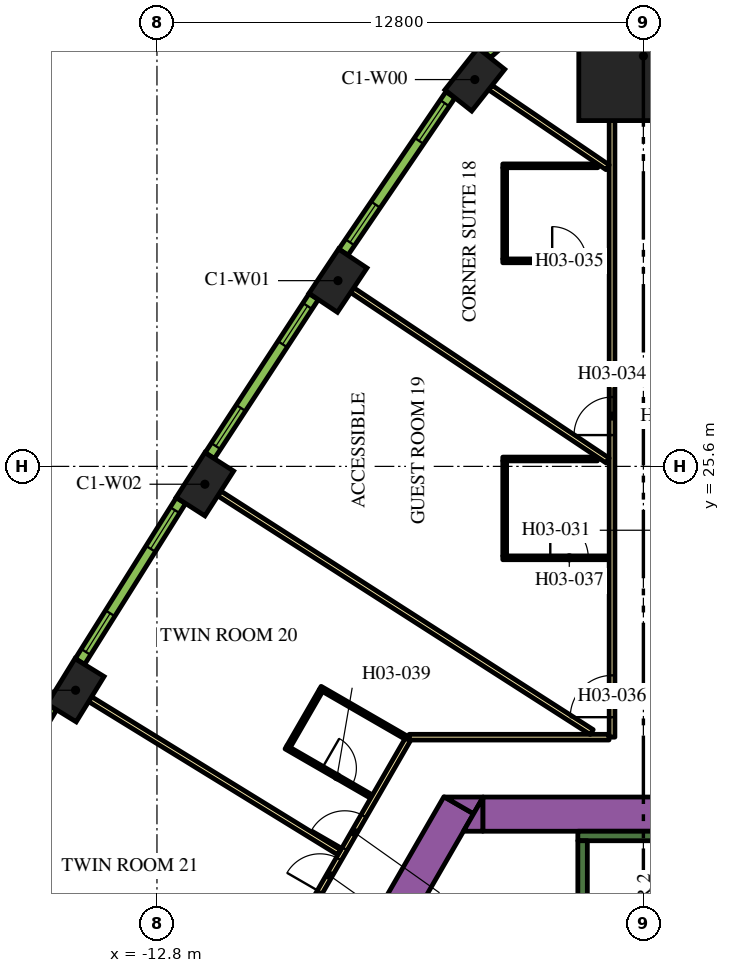
"""IFC4 building model, lengths in metres.
Left out: names, types, materials, properties, quantities, classifications, styles, units other than length and angle.
Written with IfcOpenShell. Run it as: python <this file> out.ifc"""

import sys

from ifc_helpers import new_model, si_unit, direction, frame, frame_2d, origin, origin_2d, place, context, subcontext, project, spatial, polyline, rectangle, outline, extrude, element, fill, save


model = new_model("IFC4")
c1 = context("Model", 3, precision=1e-05, world=origin(), true_north=direction((0.0, 1.0)))
c2 = subcontext(c1, "Body", "Model", "MODEL_VIEW")
j1 = project(units=[si_unit("LENGTHUNIT", "METRE"), si_unit("PLANEANGLEUNIT", "RADIAN")], contexts=[c1])
p1 = place(None, origin())
s1 = spatial("IfcSite", under=j1, at=p1, CompositionType="ELEMENT")
p2 = place(p1, origin())
s2 = spatial("IfcBuilding", under=s1, at=p2, CompositionType="ELEMENT")
p3 = place(p2, frame((0.0, 0.0, 51.0)))
s3 = spatial("IfcBuildingStorey", under=s2, at=p3, CompositionType="ELEMENT", Elevation=51.0)
p4 = place(p3, frame((0.0, 36.399, 0.0), z_axis=(0.0, 0.0, 1.0), x_axis=(0.0, 1.0, 0.0)))
e1 = element("IfcColumn", 1, at=p4, inside=s3, PredefinedType="COLUMN", context=c2, shape_type="SweptSolid", body=[
    extrude(rectangle(XDim=3.4, YDim=3.4, at=origin_2d()), origin(), (0.0, 0.0, 1.0), 3.9),
])
for number, where, z_axis, x_axis in (
    (2, (-4.436, 35.778, 0.0), (0.0, 0.0, 1.0), (-0.62, -0.784, 0.0)),
    (3, (-8.037, 30.487, 0.0), (0.0, 0.0, 1.0), (-0.555, -0.832, 0.0)),
    (4, (-11.539, 25.131, 0.0), (0.0, 0.0, 1.0), (-0.539, -0.842, 0.0)),
    (5, (-14.942, 19.71, 0.0), (0.0, 0.0, 1.0), (-0.524, -0.852, 0.0)),
):
    element("IfcColumn", number, at=place(p3, frame(where, z_axis=z_axis, x_axis=x_axis)), inside=s3, PredefinedType="COLUMN", context=c2, shape_type="SweptSolid", body=[
        extrude(rectangle(XDim=1.4, YDim=0.9, at=origin_2d()), origin(), (0.0, 0.0, 1.0), 3.9),
    ])
p5 = place(p3, frame((-15.36, -1.503, 0.0), z_axis=(0.0, 0.0, 1.0), x_axis=(0.50000389221, 0.866023156604, 0.0)))
e6 = element("IfcWall", 6, at=p5, inside=s3, PredefinedType="SOLIDWALL", context=c2, shape_type="SweptSolid", body=[
    extrude(rectangle(XDim=21.0, YDim=0.9, at=frame_2d((10.5, 0.0))), origin(), (0.0, 0.0, 1.0), 3.9),
])
p6 = place(p3, origin())
e7 = element("IfcWall", 7, at=p6, inside=s3, PredefinedType="SOLIDWALL", context=c2, shape_type="SweptSolid", body=[
    extrude(outline(polyline([(-4.215, 16.9), (-4.469, 16.46), (-5.231, 16.9), (-4.215, 16.9)])), origin(), (0.0, 0.0, 1.0), 3.9),
])
p7 = place(p3, frame((-4.224, 16.45, 0.0), z_axis=(0.0, 0.0, 1.0), x_axis=(1.0, 0.0, 0.0)))
e8 = element("IfcWall", 8, at=p7, inside=s3, PredefinedType="SOLIDWALL", context=c2, shape_type="SweptSolid", body=[
    extrude(rectangle(XDim=9.488, YDim=0.9, at=frame_2d((4.744, 0.0))), origin(), (0.0, 0.0, 1.0), 3.9),
])
e9 = element("IfcWall", 9, at=p6, inside=s3, PredefinedType="SOLIDWALL", context=c2, shape_type="SweptSolid", body=[
    extrude(outline(polyline([(-4.734, 16.0), (-4.226, 16.88), (-4.226, 16.0), (-4.734, 16.0)])), origin(), (0.0, 0.0, 1.0), 3.9),
])
p8 = place(p3, frame((-1.725, 15.875, 0.0), z_axis=(0.0, 0.0, 1.0), x_axis=(1.0, 0.0, 0.0)))
e10 = element("IfcWall", 10, at=p8, inside=s3, PredefinedType="SOLIDWALL", context=c2, shape_type="SweptSolid", body=[
    extrude(rectangle(XDim=3.45, YDim=0.25, at=frame_2d((1.725, 0.0))), origin(), (0.0, 0.0, 1.0), 3.9),
])
p9 = place(p3, frame((-1.6, 8.7, 0.0), z_axis=(0.0, 0.0, 1.0), x_axis=(0.0, 1.0, 0.0)))
e11 = element("IfcWall", 11, at=p9, inside=s3, PredefinedType="SOLIDWALL", context=c2, shape_type="SweptSolid", body=[
    extrude(rectangle(XDim=7.05, YDim=0.25, at=frame_2d((3.525, 0.0))), origin(), (0.0, 0.0, 1.0), 3.9),
])
p10 = place(p3, frame((-0.825, 18.475, 0.0), z_axis=(0.0, 0.0, 1.0), x_axis=(0.0, 1.0, 0.0)))
e12 = element("IfcWall", 12, at=p10, inside=s3, PredefinedType="PARTITIONING", context=c2, shape_type="SweptSolid", body=[
    extrude(rectangle(XDim=16.224, YDim=0.15, at=frame_2d((8.112, 0.0))), origin(), (0.0, 0.0, 1.0), 2.75),
])
p11 = place(p10, frame((7.949, 0.0, 0.0)))
e13 = element("IfcOpeningElement", 13, at=p11, cuts=e12, PredefinedType="OPENING", context=c2, shape_type="SweptSolid", body=[
    extrude(rectangle(XDim=1.0, YDim=2.1, at=frame_2d((0.5, 1.05))), frame((0.0, 0.085, 0.0), z_axis=(0.0, -1.0, 0.0), x_axis=(1.0, 0.0, 0.0)), (0.0, 0.0, 1.0), 0.17),
])
p12 = place(p10, frame((0.526, 0.0, 0.0)))
e14 = element("IfcOpeningElement", 14, at=p12, cuts=e12, PredefinedType="OPENING", context=c2, shape_type="SweptSolid", body=[
    extrude(rectangle(XDim=1.1, YDim=2.1, at=frame_2d((0.55, 1.05))), frame((0.0, 0.085, 0.0), z_axis=(0.0, -1.0, 0.0), x_axis=(1.0, 0.0, 0.0)), (0.0, 0.0, 1.0), 0.17),
])
p13 = place(p3, frame((-6.163, 18.475, 0.0), z_axis=(0.0, 0.0, 1.0), x_axis=(1.0, 0.0, 0.0)))
e15 = element("IfcWall", 15, at=p13, inside=s3, PredefinedType="PARTITIONING", context=c2, shape_type="SweptSolid", body=[
    extrude(rectangle(XDim=5.258, YDim=0.15, at=frame_2d((2.629, 0.0))), origin(), (0.0, 0.0, 1.0), 2.75),
])
p14 = place(p3, frame((-19.081, -3.9, 0.0), z_axis=(0.0, 0.0, 1.0), x_axis=(0.499998313975, 0.866026377209, 0.0)))
e16 = element("IfcWall", 16, at=p14, inside=s3, PredefinedType="PARTITIONING", context=c2, shape_type="SweptSolid", body=[
    extrude(rectangle(XDim=25.766, YDim=0.15, at=frame_2d((12.883, 0.0))), origin(), (0.0, 0.0, 1.0), 2.75),
])
p15 = place(p14, frame((22.445, 0.0, 0.0)))
e17 = element("IfcOpeningElement", 17, at=p15, cuts=e16, PredefinedType="OPENING", context=c2, shape_type="SweptSolid", body=[
    extrude(rectangle(XDim=1.0, YDim=2.1, at=frame_2d((0.5, 1.05))), frame((0.0, 0.085, 0.0), z_axis=(0.0, -1.0, 0.0), x_axis=(1.0, 0.0, 0.0)), (0.0, 0.0, 1.0), 0.17),
])
p16 = place(p14, frame((21.138, 0.0, 0.0)))
e18 = element("IfcOpeningElement", 18, at=p16, cuts=e16, PredefinedType="OPENING", context=c2, shape_type="SweptSolid", body=[
    extrude(rectangle(XDim=1.0, YDim=2.1, at=frame_2d((0.5, 1.05))), frame((0.0, 0.085, 0.0), z_axis=(0.0, -1.0, 0.0), x_axis=(1.0, 0.0, 0.0)), (0.0, 0.0, 1.0), 0.17),
])
p17 = place(p14, frame((14.066, 0.0, 0.0)))
e19 = element("IfcOpeningElement", 19, at=p17, cuts=e16, PredefinedType="OPENING", context=c2, shape_type="SweptSolid", body=[
    extrude(rectangle(XDim=0.9, YDim=2.1, at=frame_2d((0.45, 1.05))), frame((0.0, 0.085, 0.0), z_axis=(0.0, -1.0, 0.0), x_axis=(1.0, 0.0, 0.0)), (0.0, 0.0, 1.0), 0.17),
])
p18 = place(p14, frame((11.693, 0.0, 0.0)))
e20 = element("IfcOpeningElement", 20, at=p18, cuts=e16, PredefinedType="OPENING", context=c2, shape_type="SweptSolid", body=[
    extrude(rectangle(XDim=1.0, YDim=2.1, at=frame_2d((0.5, 1.05))), frame((0.0, 0.085, 0.0), z_axis=(0.0, -1.0, 0.0), x_axis=(1.0, 0.0, 0.0)), (0.0, 0.0, 1.0), 0.17),
])
p19 = place(p3, frame((-14.558, 19.475, 0.0), z_axis=(0.0, 0.0, 1.0), x_axis=(0.851829455142, -0.523819223925, 0.0)))
e21 = element("IfcWall", 21, at=p19, inside=s3, PredefinedType="PARTITIONING", context=c2, shape_type="SweptSolid", body=[
    extrude(rectangle(XDim=7.688, YDim=0.15, at=frame_2d((3.844, 0.0))), origin(), (0.0, 0.0, 1.0), 2.75),
])
p20 = place(p3, frame((-4.028, 35.569, 0.0), z_axis=(0.0, 0.0, 1.0), x_axis=(0.826700206326, -0.56264266534, 0.0)))
e22 = element("IfcWall", 22, at=p20, inside=s3, PredefinedType="PARTITIONING", context=c2, shape_type="SweptSolid", body=[
    extrude(rectangle(XDim=3.733, YDim=0.15, at=frame_2d((1.867, 0.0))), origin(), (0.0, 0.0, 1.0), 2.75),
])
p21 = place(p3, frame((-11.16, 24.888, 0.0), z_axis=(0.0, 0.0, 1.0), x_axis=(0.84199813156, -0.539480441211, 0.0)))
e23 = element("IfcWall", 23, at=p21, inside=s3, PredefinedType="PARTITIONING", context=c2, shape_type="SweptSolid", body=[
    extrude(rectangle(XDim=11.638, YDim=0.15, at=frame_2d((5.819, 0.0))), origin(), (0.0, 0.0, 1.0), 2.75),
])
p22 = place(p3, frame((-7.662, 30.238, 0.0), z_axis=(0.0, 0.0, 1.0), x_axis=(0.831882886825, -0.554951225431, 0.0)))
e24 = element("IfcWall", 24, at=p22, inside=s3, PredefinedType="PARTITIONING", context=c2, shape_type="SweptSolid", body=[
    extrude(rectangle(XDim=8.079, YDim=0.15, at=frame_2d((4.04, 0.0))), origin(), (0.0, 0.0, 1.0), 2.75),
])
p23 = place(p3, frame((-3.7, 31.009, 0.0), z_axis=(0.0, 0.0, 1.0), x_axis=(1.0, 0.0, 0.0)))
e25 = element("IfcWall", 25, at=p23, inside=s3, PredefinedType="PARTITIONING", context=c2, shape_type="SweptSolid", body=[
    extrude(rectangle(XDim=2.8, YDim=0.1, at=frame_2d((1.4, 0.0))), origin(), (0.0, 0.0, 1.0), 2.75),
])
p24 = place(p23, frame((1.3, 0.0, 0.0)))
e26 = element("IfcOpeningElement", 26, at=p24, cuts=e25, PredefinedType="OPENING", context=c2, shape_type="SweptSolid", body=[
    extrude(rectangle(XDim=0.9, YDim=2.1, at=frame_2d((0.45, 1.05))), frame((0.0, 0.06, 0.0), z_axis=(0.0, -1.0, 0.0), x_axis=(1.0, 0.0, 0.0)), (0.0, 0.0, 1.0), 0.12),
])
p25 = place(p3, frame((-3.65, 31.059, 0.0), z_axis=(0.0, 0.0, 1.0), x_axis=(0.0, 1.0, 0.0)))
e27 = element("IfcWall", 27, at=p25, inside=s3, PredefinedType="PARTITIONING", context=c2, shape_type="SweptSolid", body=[
    extrude(rectangle(XDim=2.4, YDim=0.1, at=frame_2d((1.2, 0.0))), origin(), (0.0, 0.0, 1.0), 2.75),
])
p26 = place(p3, frame((-1.2, 33.509, 0.0), z_axis=(0.0, 0.0, 1.0), x_axis=(-1.0, 0.0, 0.0)))
e28 = element("IfcWall", 28, at=p26, inside=s3, PredefinedType="PARTITIONING", context=c2, shape_type="SweptSolid", body=[
    extrude(rectangle(XDim=2.5, YDim=0.1, at=frame_2d((1.25, 0.0))), origin(), (0.0, 0.0, 1.0), 2.75),
])
p27 = place(p3, frame((-3.7, 23.195, 0.0), z_axis=(0.0, 0.0, 1.0), x_axis=(1.0, 0.0, 0.0)))
e29 = element("IfcWall", 29, at=p27, inside=s3, PredefinedType="PARTITIONING", context=c2, shape_type="SweptSolid", body=[
    extrude(rectangle(XDim=2.8, YDim=0.1, at=frame_2d((1.4, 0.0))), origin(), (0.0, 0.0, 1.0), 2.75),
])
p28 = place(p27, frame((1.25, 0.0, 0.0)))
e30 = element("IfcOpeningElement", 30, at=p28, cuts=e29, PredefinedType="OPENING", context=c2, shape_type="SweptSolid", body=[
    extrude(rectangle(XDim=1.0, YDim=2.1, at=frame_2d((0.5, 1.05))), frame((0.0, 0.06, 0.0), z_axis=(0.0, -1.0, 0.0), x_axis=(1.0, 0.0, 0.0)), (0.0, 0.0, 1.0), 0.12),
])
p29 = place(p3, frame((-3.65, 23.245, 0.0), z_axis=(0.0, 0.0, 1.0), x_axis=(0.0, 1.0, 0.0)))
e31 = element("IfcWall", 31, at=p29, inside=s3, PredefinedType="PARTITIONING", context=c2, shape_type="SweptSolid", body=[
    extrude(rectangle(XDim=2.5, YDim=0.1, at=frame_2d((1.25, 0.0))), origin(), (0.0, 0.0, 1.0), 2.75),
])
p30 = place(p3, frame((-1.21, 25.795, 0.0), z_axis=(0.0, 0.0, 1.0), x_axis=(-1.0, 0.0, 0.0)))
e32 = element("IfcWall", 32, at=p30, inside=s3, PredefinedType="PARTITIONING", context=c2, shape_type="SweptSolid", body=[
    extrude(rectangle(XDim=2.49, YDim=0.1, at=frame_2d((1.245, 0.0))), origin(), (0.0, 0.0, 1.0), 2.75),
])
p31 = place(p3, frame((-9.405, 18.21, 0.0), z_axis=(0.0, 0.0, 1.0), x_axis=(0.865997922154, -0.500047596559, 0.0)))
e33 = element("IfcWall", 33, at=p31, inside=s3, PredefinedType="PARTITIONING", context=c2, shape_type="SweptSolid", body=[
    extrude(rectangle(XDim=2.6, YDim=0.1, at=frame_2d((1.3, 0.0))), origin(), (0.0, 0.0, 1.0), 2.75),
])
p32 = place(p31, frame((1.1, 0.0, 0.0)))
e34 = element("IfcOpeningElement", 34, at=p32, cuts=e33, PredefinedType="OPENING", context=c2, shape_type="SweptSolid", body=[
    extrude(rectangle(XDim=0.9, YDim=2.1, at=frame_2d((0.45, 1.05))), frame((0.0, 0.06, 0.0), z_axis=(0.0, -1.0, 0.0), x_axis=(1.0, 0.0, 0.0)), (0.0, 0.0, 1.0), 0.12),
])
p33 = place(p3, frame((-9.336, 18.229, 0.0), z_axis=(0.0, 0.0, 1.0), x_axis=(0.499954529098, 0.86605165483, 0.0)))
e35 = element("IfcWall", 35, at=p33, inside=s3, PredefinedType="PARTITIONING", context=c2, shape_type="SweptSolid", body=[
    extrude(rectangle(XDim=1.7, YDim=0.1, at=frame_2d((0.85, 0.0))), origin(), (0.0, 0.0, 1.0), 2.75),
])
p34 = place(p3, frame((-6.253, 18.469, 0.0), z_axis=(0.0, 0.0, 1.0), x_axis=(-0.866021400173, 0.500006934395, 0.0)))
e36 = element("IfcWall", 36, at=p34, inside=s3, PredefinedType="PARTITIONING", context=c2, shape_type="SweptSolid", body=[
    extrude(rectangle(XDim=2.6, YDim=0.1, at=frame_2d((1.3, 0.0))), origin(), (0.0, 0.0, 1.0), 2.75),
])
p35 = place(p3, frame((-3.064, 37.395, 0.0), z_axis=(0.0, 0.0, 1.0), x_axis=(-0.749812680302, -0.661650167731, 0.0)))
e37 = element("IfcWall", 37, at=p35, inside=s3, PredefinedType="SOLIDWALL", context=c2, shape_type="SweptSolid", body=[
    extrude(rectangle(XDim=1.415, YDim=0.29, at=frame_2d((0.708, 0.0))), origin(), (0.0, 0.0, 1.0), 3.65),
])
p36 = place(p35, frame((0.258, 0.0, 0.9)))
e38 = element("IfcOpeningElement", 38, at=p36, cuts=e37, PredefinedType="OPENING", context=c2, shape_type="SweptSolid", body=[
    extrude(rectangle(XDim=0.9, YDim=2.15, at=frame_2d((0.45, 1.075))), frame((0.0, 0.155, 0.0), z_axis=(0.0, -1.0, 0.0), x_axis=(1.0, 0.0, 0.0)), (0.0, 0.0, 1.0), 0.31),
])
p37 = place(p3, frame((-5.078, 35.376, 0.0), z_axis=(0.0, 0.0, 1.0), x_axis=(-0.562610153679, -0.826722332454, 0.0)))
e39 = element("IfcWall", 39, at=p37, inside=s3, PredefinedType="SOLIDWALL", context=c2, shape_type="SweptSolid", body=[
    extrude(rectangle(XDim=5.006, YDim=0.29, at=frame_2d((2.503, 0.0))), origin(), (0.0, 0.0, 1.0), 3.65),
])
p38 = place(p37, frame((0.265, 0.0, 0.9)))
e40 = element("IfcOpeningElement", 40, at=p38, cuts=e39, PredefinedType="OPENING", context=c2, shape_type="SweptSolid", body=[
    extrude(rectangle(XDim=1.2, YDim=2.15, at=frame_2d((0.6, 1.075))), frame((0.0, 0.155, 0.0), z_axis=(0.0, -1.0, 0.0), x_axis=(1.0, 0.0, 0.0)), (0.0, 0.0, 1.0), 0.31),
])
p39 = place(p37, frame((3.495, 0.0, 0.9)))
e41 = element("IfcOpeningElement", 41, at=p39, cuts=e39, PredefinedType="OPENING", context=c2, shape_type="SweptSolid", body=[
    extrude(rectangle(XDim=1.2, YDim=2.15, at=frame_2d((0.6, 1.075))), frame((0.0, 0.155, 0.0), z_axis=(0.0, -1.0, 0.0), x_axis=(1.0, 0.0, 0.0)), (0.0, 0.0, 1.0), 0.31),
])
p40 = place(p3, frame((-8.676, 30.068, 0.0), z_axis=(0.0, 0.0, 1.0), x_axis=(-0.547204617628, -0.836998868845, 0.0)))
e42 = element("IfcWall", 42, at=p40, inside=s3, PredefinedType="SOLIDWALL", context=c2, shape_type="SweptSolid", body=[
    extrude(rectangle(XDim=4.998, YDim=0.29, at=frame_2d((2.499, 0.0))), origin(), (0.0, 0.0, 1.0), 3.65),
])
p41 = place(p40, frame((0.297, 0.0, 0.9)))
e43 = element("IfcOpeningElement", 43, at=p41, cuts=e42, PredefinedType="OPENING", context=c2, shape_type="SweptSolid", body=[
    extrude(rectangle(XDim=1.2, YDim=2.15, at=frame_2d((0.6, 1.075))), frame((0.0, 0.155, 0.0), z_axis=(0.0, -1.0, 0.0), x_axis=(1.0, 0.0, 0.0)), (0.0, 0.0, 1.0), 0.31),
])
p42 = place(p40, frame((3.501, 0.0, 0.9)))
e44 = element("IfcOpeningElement", 44, at=p42, cuts=e42, PredefinedType="OPENING", context=c2, shape_type="SweptSolid", body=[
    extrude(rectangle(XDim=1.2, YDim=2.15, at=frame_2d((0.6, 1.075))), frame((0.0, 0.155, 0.0), z_axis=(0.0, -1.0, 0.0), x_axis=(1.0, 0.0, 0.0)), (0.0, 0.0, 1.0), 0.31),
])
p43 = place(p3, frame((-12.17, 24.699, 0.0), z_axis=(0.0, 0.0, 1.0), x_axis=(-0.531688286542, -0.846940119462, 0.0)))
e45 = element("IfcWall", 45, at=p43, inside=s3, PredefinedType="SOLIDWALL", context=c2, shape_type="SweptSolid", body=[
    extrude(rectangle(XDim=4.998, YDim=0.29, at=frame_2d((2.499, 0.0))), origin(), (0.0, 0.0, 1.0), 3.65),
])
p44 = place(p43, frame((0.297, 0.0, 0.9)))
e46 = element("IfcOpeningElement", 46, at=p44, cuts=e45, PredefinedType="OPENING", context=c2, shape_type="SweptSolid", body=[
    extrude(rectangle(XDim=1.2, YDim=2.15, at=frame_2d((0.6, 1.075))), frame((0.0, 0.155, 0.0), z_axis=(0.0, -1.0, 0.0), x_axis=(1.0, 0.0, 0.0)), (0.0, 0.0, 1.0), 0.31),
])
p45 = place(p43, frame((3.501, 0.0, 0.9)))
e47 = element("IfcOpeningElement", 47, at=p45, cuts=e45, PredefinedType="OPENING", context=c2, shape_type="SweptSolid", body=[
    extrude(rectangle(XDim=1.2, YDim=2.15, at=frame_2d((0.6, 1.075))), frame((0.0, 0.155, 0.0), z_axis=(0.0, -1.0, 0.0), x_axis=(1.0, 0.0, 0.0)), (0.0, 0.0, 1.0), 0.31),
])
p46 = place(p3, frame((-15.564, 19.267, 0.0), z_axis=(0.0, 0.0, 1.0), x_axis=(-0.515938796285, -0.856625448191, 0.0)))
e48 = element("IfcWall", 48, at=p46, inside=s3, PredefinedType="SOLIDWALL", context=c2, shape_type="SweptSolid", body=[
    extrude(rectangle(XDim=4.998, YDim=0.29, at=frame_2d((2.499, 0.0))), origin(), (0.0, 0.0, 1.0), 3.65),
])
p47 = place(p46, frame((0.297, 0.0, 0.9)))
e49 = element("IfcOpeningElement", 49, at=p47, cuts=e48, PredefinedType="OPENING", context=c2, shape_type="SweptSolid", body=[
    extrude(rectangle(XDim=1.2, YDim=2.15, at=frame_2d((0.6, 1.075))), frame((0.0, 0.155, 0.0), z_axis=(0.0, -1.0, 0.0), x_axis=(1.0, 0.0, 0.0)), (0.0, 0.0, 1.0), 0.31),
])
p48 = place(p46, frame((3.501, 0.0, 0.9)))
e50 = element("IfcOpeningElement", 50, at=p48, cuts=e48, PredefinedType="OPENING", context=c2, shape_type="SweptSolid", body=[
    extrude(rectangle(XDim=1.2, YDim=2.15, at=frame_2d((0.6, 1.075))), frame((0.0, 0.155, 0.0), z_axis=(0.0, -1.0, 0.0), x_axis=(1.0, 0.0, 0.0)), (0.0, 0.0, 1.0), 0.31),
])
p49 = place(p11, origin())
e51 = element("IfcDoor", 51, at=p49, inside=s3, OperationType="SINGLE_SWING_LEFT", PredefinedType="DOOR", context=c2, shape_type="SweptSolid", body=[
    extrude(rectangle(XDim=1.0, YDim=2.1, at=frame_2d((0.5, 1.05))), frame((0.0, 0.025, 0.0), z_axis=(0.0, -1.0, 0.0), x_axis=(1.0, 0.0, 0.0)), (0.0, 0.0, 1.0), 0.05),
])
fill(e13, e51)
p50 = place(p24, origin())
e52 = element("IfcDoor", 52, at=p50, inside=s3, OperationType="SINGLE_SWING_RIGHT", PredefinedType="DOOR", context=c2, shape_type="SweptSolid", body=[
    extrude(rectangle(XDim=0.9, YDim=2.1, at=frame_2d((0.45, 1.05))), frame((0.0, 0.025, 0.0), z_axis=(0.0, -1.0, 0.0), x_axis=(1.0, 0.0, 0.0)), (0.0, 0.0, 1.0), 0.05),
])
fill(e26, e52)
p51 = place(p12, origin())
e53 = element("IfcDoor", 53, at=p51, inside=s3, OperationType="SINGLE_SWING_LEFT", PredefinedType="DOOR", context=c2, shape_type="SweptSolid", body=[
    extrude(rectangle(XDim=1.1, YDim=2.1, at=frame_2d((0.55, 1.05))), frame((0.0, 0.025, 0.0), z_axis=(0.0, -1.0, 0.0), x_axis=(1.0, 0.0, 0.0)), (0.0, 0.0, 1.0), 0.05),
])
fill(e14, e53)
p52 = place(p28, origin())
e54 = element("IfcDoor", 54, at=p52, inside=s3, OperationType="SINGLE_SWING_LEFT", PredefinedType="DOOR", context=c2, shape_type="SweptSolid", body=[
    extrude(rectangle(XDim=1.0, YDim=2.1, at=frame_2d((0.5, 1.05))), frame((0.0, 0.025, 0.0), z_axis=(0.0, -1.0, 0.0), x_axis=(1.0, 0.0, 0.0)), (0.0, 0.0, 1.0), 0.05),
])
fill(e30, e54)
p53 = place(p15, origin())
e55 = element("IfcDoor", 55, at=p53, inside=s3, OperationType="SINGLE_SWING_LEFT", PredefinedType="DOOR", context=c2, shape_type="SweptSolid", body=[
    extrude(rectangle(XDim=1.0, YDim=2.1, at=frame_2d((0.5, 1.05))), frame((0.0, 0.025, 0.0), z_axis=(0.0, -1.0, 0.0), x_axis=(1.0, 0.0, 0.0)), (0.0, 0.0, 1.0), 0.05),
])
fill(e17, e55)
p54 = place(p32, origin())
e56 = element("IfcDoor", 56, at=p54, inside=s3, OperationType="SINGLE_SWING_LEFT", PredefinedType="DOOR", context=c2, shape_type="SweptSolid", body=[
    extrude(rectangle(XDim=0.9, YDim=2.1, at=frame_2d((0.45, 1.05))), frame((0.0, 0.025, 0.0), z_axis=(0.0, -1.0, 0.0), x_axis=(1.0, 0.0, 0.0)), (0.0, 0.0, 1.0), 0.05),
])
fill(e34, e56)
p55 = place(p16, origin())
e57 = element("IfcDoor", 57, at=p55, inside=s3, OperationType="SINGLE_SWING_RIGHT", PredefinedType="DOOR", context=c2, shape_type="SweptSolid", body=[
    extrude(rectangle(XDim=1.0, YDim=2.1, at=frame_2d((0.5, 1.05))), frame((0.0, 0.025, 0.0), z_axis=(0.0, -1.0, 0.0), x_axis=(1.0, 0.0, 0.0)), (0.0, 0.0, 1.0), 0.05),
])
fill(e18, e57)
p56 = place(p38, origin())
e58 = element("IfcWindow", 58, at=p56, inside=s3, PartitioningType="DOUBLE_PANEL_VERTICAL", PredefinedType="WINDOW", context=c2, shape_type="SweptSolid", body=[
    extrude(rectangle(XDim=1.2, YDim=2.15, at=frame_2d((0.6, 1.075))), frame((0.0, 0.015, 0.0), z_axis=(0.0, -1.0, 0.0), x_axis=(1.0, 0.0, 0.0)), (0.0, 0.0, 1.0), 0.06),
])
fill(e40, e58)
p57 = place(p39, origin())
e59 = element("IfcWindow", 59, at=p57, inside=s3, PartitioningType="DOUBLE_PANEL_VERTICAL", PredefinedType="WINDOW", context=c2, shape_type="SweptSolid", body=[
    extrude(rectangle(XDim=1.2, YDim=2.15, at=frame_2d((0.6, 1.075))), frame((0.0, 0.015, 0.0), z_axis=(0.0, -1.0, 0.0), x_axis=(1.0, 0.0, 0.0)), (0.0, 0.0, 1.0), 0.06),
])
fill(e41, e59)
p58 = place(p41, origin())
e60 = element("IfcWindow", 60, at=p58, inside=s3, PartitioningType="DOUBLE_PANEL_VERTICAL", PredefinedType="WINDOW", context=c2, shape_type="SweptSolid", body=[
    extrude(rectangle(XDim=1.2, YDim=2.15, at=frame_2d((0.6, 1.075))), frame((0.0, 0.015, 0.0), z_axis=(0.0, -1.0, 0.0), x_axis=(1.0, 0.0, 0.0)), (0.0, 0.0, 1.0), 0.06),
])
fill(e43, e60)
p59 = place(p42, origin())
e61 = element("IfcWindow", 61, at=p59, inside=s3, PartitioningType="DOUBLE_PANEL_VERTICAL", PredefinedType="WINDOW", context=c2, shape_type="SweptSolid", body=[
    extrude(rectangle(XDim=1.2, YDim=2.15, at=frame_2d((0.6, 1.075))), frame((0.0, 0.015, 0.0), z_axis=(0.0, -1.0, 0.0), x_axis=(1.0, 0.0, 0.0)), (0.0, 0.0, 1.0), 0.06),
])
fill(e44, e61)
p60 = place(p44, origin())
e62 = element("IfcWindow", 62, at=p60, inside=s3, PartitioningType="DOUBLE_PANEL_VERTICAL", PredefinedType="WINDOW", context=c2, shape_type="SweptSolid", body=[
    extrude(rectangle(XDim=1.2, YDim=2.15, at=frame_2d((0.6, 1.075))), frame((0.0, 0.015, 0.0), z_axis=(0.0, -1.0, 0.0), x_axis=(1.0, 0.0, 0.0)), (0.0, 0.0, 1.0), 0.06),
])
fill(e46, e62)
p61 = place(p45, origin())
e63 = element("IfcWindow", 63, at=p61, inside=s3, PartitioningType="DOUBLE_PANEL_VERTICAL", PredefinedType="WINDOW", context=c2, shape_type="SweptSolid", body=[
    extrude(rectangle(XDim=1.2, YDim=2.15, at=frame_2d((0.6, 1.075))), frame((0.0, 0.015, 0.0), z_axis=(0.0, -1.0, 0.0), x_axis=(1.0, 0.0, 0.0)), (0.0, 0.0, 1.0), 0.06),
])
fill(e47, e63)
save(model, sys.argv[1])
